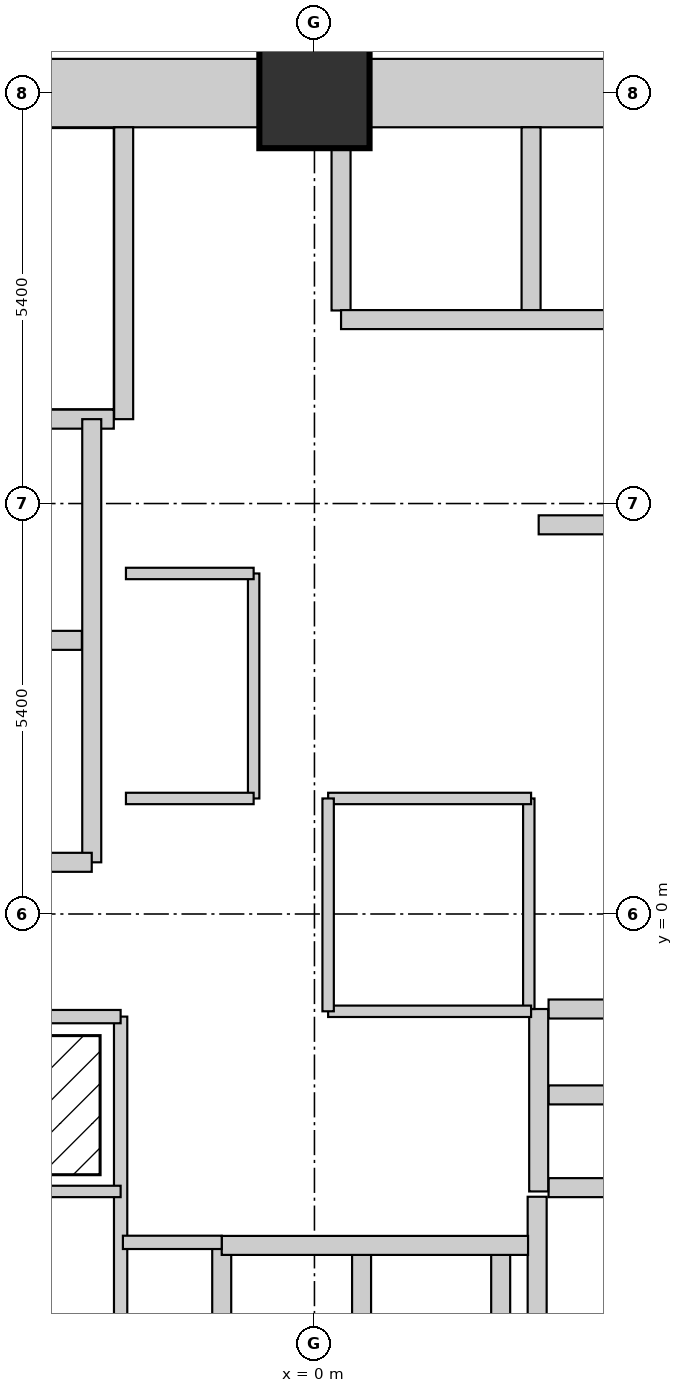
"""IFC4 building model, lengths in metres.
Left out: names, types, materials, properties, quantities, classifications, styles, units other than length and angle.
Written with IfcOpenShell. Run it as: python <this file> out.ifc"""

import sys

from ifc_helpers import new_model, si_unit, direction, frame, frame_2d, origin, origin_2d, place, context, subcontext, project, spatial, rectangle, extrude, element, fill, save


model = new_model("IFC4")
c1 = context("Model", 3, precision=1e-05, world=origin(), true_north=direction((0.0, 1.0)))
c2 = subcontext(c1, "Body", "Model", "MODEL_VIEW")
j1 = project(units=[si_unit("LENGTHUNIT", "METRE"), si_unit("PLANEANGLEUNIT", "RADIAN")], contexts=[c1])
p1 = place(None, origin())
s1 = spatial("IfcSite", under=j1, at=p1, CompositionType="ELEMENT")
p2 = place(p1, origin())
s2 = spatial("IfcBuilding", under=s1, at=p2, CompositionType="ELEMENT")
p3 = place(p2, frame((0.0, 0.0, 9.0)))
s3 = spatial("IfcBuildingStorey", under=s2, at=p3, CompositionType="ELEMENT", Elevation=9.0)
p4 = place(p3, frame((0.0, 10.8, 0.0), z_axis=(0.0, 0.0, 1.0), x_axis=(1.0, 0.0, 0.0)))
e1 = element("IfcColumn", 1, at=p4, inside=s3, PredefinedType="COLUMN", context=c2, shape_type="SweptSolid", body=[
    extrude(rectangle(XDim=1.45, YDim=1.45, at=origin_2d()), origin(), (0.0, 0.0, 1.0), 4.5),
])
p5 = place(p3, frame((-4.665, 10.8, 0.0), z_axis=(0.0, 0.0, 1.0), x_axis=(1.0, 0.0, 0.0)))
e2 = element("IfcWall", 2, at=p5, inside=s3, PredefinedType="SHEAR", context=c2, shape_type="SweptSolid", body=[
    extrude(rectangle(XDim=3.93, YDim=0.9, at=frame_2d((1.965, 0.0))), origin(), (0.0, 0.0, 1.0), 4.5),
])
p6 = place(p5, frame((2.58, 0.0, 0.0)))
e3 = element("IfcOpeningElement", 3, at=p6, cuts=e2, PredefinedType="OPENING", context=c2, shape_type="SweptSolid", body=[
    extrude(rectangle(XDim=1.1, YDim=2.1, at=frame_2d((0.55, 1.05))), frame((0.0, 0.46, 0.0), z_axis=(0.0, -1.0, 0.0), x_axis=(1.0, 0.0, 0.0)), (0.0, 0.0, 1.0), 0.92),
])
p7 = place(p3, frame((0.735, 10.8, 0.0), z_axis=(0.0, 0.0, 1.0), x_axis=(1.0, 0.0, 0.0)))
e4 = element("IfcWall", 4, at=p7, inside=s3, PredefinedType="SHEAR", context=c2, shape_type="SweptSolid", body=[
    extrude(rectangle(XDim=3.93, YDim=0.9, at=frame_2d((1.965, 0.0))), origin(), (0.0, 0.0, 1.0), 4.5),
])
p8 = place(p3, frame((2.93, -6.51, 0.0), z_axis=(0.0, 0.0, 1.0), x_axis=(0.0, 1.0, 0.0)))
e5 = element("IfcWall", 5, at=p8, inside=s3, PredefinedType="SHEAR", context=c2, shape_type="SweptSolid", body=[
    extrude(rectangle(XDim=2.79, YDim=0.25, at=frame_2d((1.395, 0.0))), origin(), (0.0, 0.0, 1.0), 4.5),
])
p9 = place(p3, frame((3.08, -3.6, 0.0), z_axis=(0.0, 0.0, 1.0), x_axis=(1.0, 0.0, 0.0)))
e6 = element("IfcWall", 6, at=p9, inside=s3, PredefinedType="SHEAR", context=c2, shape_type="SweptSolid", body=[
    extrude(rectangle(XDim=2.37, YDim=0.25, at=frame_2d((1.185, 0.0))), origin(), (0.0, 0.0, 1.0), 4.5),
])
for number, where, z_axis, x_axis in (
    (7, (0.62, -6.34, 0.0), (0.0, 0.0, 1.0), (0.0, 1.0, 0.0)),
    (8, (2.45, -6.34, 0.0), (0.0, 0.0, 1.0), (0.0, 1.0, 0.0)),
):
    element("IfcWall", number, at=place(p3, frame(where, z_axis=z_axis, x_axis=x_axis)), inside=s3, PredefinedType="SHEAR", context=c2, shape_type="SweptSolid", body=[
        extrude(rectangle(XDim=1.88, YDim=0.25, at=frame_2d((0.94, 0.0))), origin(), (0.0, 0.0, 1.0), 4.5),
    ])
p10 = place(p3, frame((-1.22, -6.44, 0.0), z_axis=(0.0, 0.0, 1.0), x_axis=(0.0, 1.0, 0.0)))
e9 = element("IfcWall", 9, at=p10, inside=s3, PredefinedType="SHEAR", context=c2, shape_type="SweptSolid", body=[
    extrude(rectangle(XDim=2.08, YDim=0.25, at=frame_2d((1.04, 0.0))), origin(), (0.0, 0.0, 1.0), 4.5),
])
p11 = place(p3, frame((-1.22, -4.36, 0.0), z_axis=(0.0, 0.0, 1.0), x_axis=(1.0, 0.0, 0.0)))
e10 = element("IfcWall", 10, at=p11, inside=s3, PredefinedType="SHEAR", context=c2, shape_type="SweptSolid", body=[
    extrude(rectangle(XDim=4.03, YDim=0.25, at=frame_2d((2.015, 0.0))), origin(), (0.0, 0.0, 1.0), 4.5),
])
p12 = place(p3, frame((2.85, 7.94, 0.0), z_axis=(0.0, 0.0, 1.0), x_axis=(0.0, 1.0, 0.0)))
e11 = element("IfcWall", 11, at=p12, inside=s3, PredefinedType="SHEAR", context=c2, shape_type="SweptSolid", body=[
    extrude(rectangle(XDim=2.41, YDim=0.25, at=frame_2d((1.205, 0.0))), origin(), (0.0, 0.0, 1.0), 4.5),
])
p13 = place(p3, frame((0.35, 7.94, 0.0), z_axis=(0.0, 0.0, 1.0), x_axis=(0.0, 1.0, 0.0)))
e12 = element("IfcWall", 12, at=p13, inside=s3, PredefinedType="SHEAR", context=c2, shape_type="SweptSolid", body=[
    extrude(rectangle(XDim=2.135, YDim=0.25, at=frame_2d((1.067, 0.0))), origin(), (0.0, 0.0, 1.0), 4.5),
])
p14 = place(p3, frame((0.35, 7.82, 0.0), z_axis=(0.0, 0.0, 1.0), x_axis=(1.0, 0.0, 0.0)))
e13 = element("IfcWall", 13, at=p14, inside=s3, PredefinedType="SHEAR", context=c2, shape_type="SweptSolid", body=[
    extrude(rectangle(XDim=10.0, YDim=0.25, at=frame_2d((5.0, 0.0))), origin(), (0.0, 0.0, 1.0), 4.5),
])
p15 = place(p14, frame((0.7, 0.0, 0.0)))
e14 = element("IfcOpeningElement", 14, at=p15, cuts=e13, PredefinedType="OPENING", context=c2, shape_type="SweptSolid", body=[
    extrude(rectangle(XDim=1.1, YDim=2.1, at=frame_2d((0.55, 1.05))), frame((0.0, 0.135, 0.0), z_axis=(0.0, -1.0, 0.0), x_axis=(1.0, 0.0, 0.0)), (0.0, 0.0, 1.0), 0.27),
])
p16 = place(p14, frame((3.2, 0.0, 0.0)))
e15 = element("IfcOpeningElement", 15, at=p16, cuts=e13, PredefinedType="OPENING", context=c2, shape_type="SweptSolid", body=[
    extrude(rectangle(XDim=1.1, YDim=2.1, at=frame_2d((0.55, 1.05))), frame((0.0, 0.135, 0.0), z_axis=(0.0, -1.0, 0.0), x_axis=(1.0, 0.0, 0.0)), (0.0, 0.0, 1.0), 0.27),
])
p17 = place(p14, frame((5.7, 0.0, 0.0)))
e16 = element("IfcOpeningElement", 16, at=p17, cuts=e13, PredefinedType="OPENING", context=c2, shape_type="SweptSolid", body=[
    extrude(rectangle(XDim=1.1, YDim=2.1, at=frame_2d((0.55, 1.05))), frame((0.0, 0.135, 0.0), z_axis=(0.0, -1.0, 0.0), x_axis=(1.0, 0.0, 0.0)), (0.0, 0.0, 1.0), 0.27),
])
p18 = place(p14, frame((8.2, 0.0, 0.0)))
e17 = element("IfcOpeningElement", 17, at=p18, cuts=e13, PredefinedType="OPENING", context=c2, shape_type="SweptSolid", body=[
    extrude(rectangle(XDim=1.1, YDim=2.1, at=frame_2d((0.55, 1.05))), frame((0.0, 0.135, 0.0), z_axis=(0.0, -1.0, 0.0), x_axis=(1.0, 0.0, 0.0)), (0.0, 0.0, 1.0), 0.27),
])
p19 = place(p3, frame((2.95, 5.12, 0.0), z_axis=(0.0, 0.0, 1.0), x_axis=(1.0, 0.0, 0.0)))
e18 = element("IfcWall", 18, at=p19, inside=s3, PredefinedType="SHEAR", context=c2, shape_type="SweptSolid", body=[
    extrude(rectangle(XDim=7.125, YDim=0.25, at=frame_2d((3.562, 0.0))), origin(), (0.0, 0.0, 1.0), 4.5),
])
for number, where, z_axis, x_axis in (
    (19, (3.08, -2.38, 0.0), (0.0, 0.0, 1.0), (1.0, 0.0, 0.0)),
    (20, (3.08, -1.25, 0.0), (0.0, 0.0, 1.0), (1.0, 0.0, 0.0)),
):
    element("IfcWall", number, at=place(p3, frame(where, z_axis=z_axis, x_axis=x_axis)), inside=s3, PredefinedType="SHEAR", context=c2, shape_type="SweptSolid", body=[
        extrude(rectangle(XDim=2.37, YDim=0.25, at=frame_2d((1.185, 0.0))), origin(), (0.0, 0.0, 1.0), 4.5),
    ])
p20 = place(p3, frame((2.95, -3.65, 0.0), z_axis=(0.0, 0.0, 1.0), x_axis=(0.0, 1.0, 0.0)))
e21 = element("IfcWall", 21, at=p20, inside=s3, PredefinedType="SHEAR", context=c2, shape_type="SweptSolid", body=[
    extrude(rectangle(XDim=2.4, YDim=0.25, at=frame_2d((1.2, 0.0))), origin(), (0.0, 0.0, 1.0), 4.5),
])
p21 = place(p20, frame((0.775, 0.0, 0.0)))
e22 = element("IfcOpeningElement", 22, at=p21, cuts=e21, PredefinedType="OPENING", context=c2, shape_type="SweptSolid", body=[
    extrude(rectangle(XDim=0.85, YDim=2.1, at=frame_2d((0.425, 1.05))), frame((0.0, 0.135, 0.0), z_axis=(0.0, -1.0, 0.0), x_axis=(1.0, 0.0, 0.0)), (0.0, 0.0, 1.0), 0.27),
])
p22 = place(p3, frame((-2.51, 6.51, 0.0), z_axis=(0.0, 0.0, 1.0), x_axis=(0.0, 1.0, 0.0)))
e23 = element("IfcWall", 23, at=p22, inside=s3, PredefinedType="SHEAR", context=c2, shape_type="SweptSolid", body=[
    extrude(rectangle(XDim=3.84, YDim=0.25, at=frame_2d((1.92, 0.0))), origin(), (0.0, 0.0, 1.0), 4.5),
])
p23 = place(p3, frame((-10.34, 6.51, 0.0), z_axis=(0.0, 0.0, 1.0), x_axis=(1.0, 0.0, 0.0)))
e24 = element("IfcWall", 24, at=p23, inside=s3, PredefinedType="SHEAR", context=c2, shape_type="SweptSolid", body=[
    extrude(rectangle(XDim=7.7, YDim=0.25, at=frame_2d((3.85, 0.0))), origin(), (0.0, 0.0, 1.0), 4.5),
])
p24 = place(p23, frame((0.35, 0.0, 0.0)))
e25 = element("IfcOpeningElement", 25, at=p24, cuts=e24, PredefinedType="OPENING", context=c2, shape_type="SweptSolid", body=[
    extrude(rectangle(XDim=1.1, YDim=2.1, at=frame_2d((0.55, 1.05))), frame((0.0, 0.135, 0.0), z_axis=(0.0, -1.0, 0.0), x_axis=(1.0, 0.0, 0.0)), (0.0, 0.0, 1.0), 0.27),
])
p25 = place(p3, frame((-2.93, 0.68, 0.0), z_axis=(0.0, 0.0, 1.0), x_axis=(0.0, 1.0, 0.0)))
e26 = element("IfcWall", 26, at=p25, inside=s3, PredefinedType="SHEAR", context=c2, shape_type="SweptSolid", body=[
    extrude(rectangle(XDim=5.83, YDim=0.25, at=frame_2d((2.915, 0.0))), origin(), (0.0, 0.0, 1.0), 4.5),
])
p26 = place(p25, frame((0.75, 0.0, 0.0)))
e27 = element("IfcOpeningElement", 27, at=p26, cuts=e26, PredefinedType="OPENING", context=c2, shape_type="SweptSolid", body=[
    extrude(rectangle(XDim=1.2, YDim=2.1, at=frame_2d((0.6, 1.05))), frame((0.0, 0.135, 0.0), z_axis=(0.0, -1.0, 0.0), x_axis=(1.0, 0.0, 0.0)), (0.0, 0.0, 1.0), 0.27),
])
p27 = place(p3, frame((-5.45, 3.6, 0.0), z_axis=(0.0, 0.0, 1.0), x_axis=(1.0, 0.0, 0.0)))
e28 = element("IfcWall", 28, at=p27, inside=s3, PredefinedType="SHEAR", context=c2, shape_type="SweptSolid", body=[
    extrude(rectangle(XDim=2.39, YDim=0.25, at=frame_2d((1.195, 0.0))), origin(), (0.0, 0.0, 1.0), 4.5),
])
p28 = place(p3, frame((-5.58, 0.68, 0.0), z_axis=(0.0, 0.0, 1.0), x_axis=(1.0, 0.0, 0.0)))
e29 = element("IfcWall", 29, at=p28, inside=s3, PredefinedType="SHEAR", context=c2, shape_type="SweptSolid", body=[
    extrude(rectangle(XDim=2.65, YDim=0.25, at=frame_2d((1.325, 0.0))), origin(), (0.0, 0.0, 1.0), 4.5),
])
p29 = place(p3, frame((2.82, -1.25, 0.0), z_axis=(0.0, 0.0, 1.0), x_axis=(0.0, 1.0, 0.0)))
e30 = element("IfcWall", 30, at=p29, inside=s3, PredefinedType="PARTITIONING", context=c2, shape_type="SweptSolid", body=[
    extrude(rectangle(XDim=2.77, YDim=0.15, at=frame_2d((1.385, 0.0))), origin(), (0.0, 0.0, 1.0), 4.25),
])
for number, where, z_axis, x_axis in (
    (31, (0.18, 1.52, 0.0), (0.0, 0.0, 1.0), (1.0, 0.0, 0.0)),
    (32, (0.18, -1.28, 0.0), (0.0, 0.0, 1.0), (1.0, 0.0, 0.0)),
):
    element("IfcWall", number, at=place(p3, frame(where, z_axis=z_axis, x_axis=x_axis)), inside=s3, PredefinedType="PARTITIONING", context=c2, shape_type="SweptSolid", body=[
        extrude(rectangle(XDim=2.67, YDim=0.15, at=frame_2d((1.335, 0.0))), origin(), (0.0, 0.0, 1.0), 4.25),
    ])
p30 = place(p3, frame((0.18, -1.28, 0.0), z_axis=(0.0, 0.0, 1.0), x_axis=(0.0, 1.0, 0.0)))
e33 = element("IfcWall", 33, at=p30, inside=s3, PredefinedType="PARTITIONING", context=c2, shape_type="SweptSolid", body=[
    extrude(rectangle(XDim=2.8, YDim=0.15, at=frame_2d((1.4, 0.0))), origin(), (0.0, 0.0, 1.0), 4.25),
])
p31 = place(p30, frame((0.85, 0.0, 0.0)))
e34 = element("IfcOpeningElement", 34, at=p31, cuts=e33, PredefinedType="OPENING", context=c2, shape_type="SweptSolid", body=[
    extrude(rectangle(XDim=0.85, YDim=2.1, at=frame_2d((0.425, 1.05))), frame((0.0, 0.085, 0.0), z_axis=(0.0, -1.0, 0.0), x_axis=(1.0, 0.0, 0.0)), (0.0, 0.0, 1.0), 0.17),
])
p32 = place(p3, frame((-2.55, -6.51, 0.0), z_axis=(0.0, 0.0, 1.0), x_axis=(0.0, 1.0, 0.0)))
e35 = element("IfcWall", 35, at=p32, inside=s3, PredefinedType="PARTITIONING", context=c2, shape_type="SweptSolid", body=[
    extrude(rectangle(XDim=5.16, YDim=0.175, at=frame_2d((2.58, 0.0))), origin(), (0.0, 0.0, 1.0), 4.25),
])
p33 = place(p32, frame((3.45, 0.0, 0.0)))
e36 = element("IfcOpeningElement", 36, at=p33, cuts=e35, PredefinedType="OPENING", context=c2, shape_type="SweptSolid", body=[
    extrude(rectangle(XDim=0.85, YDim=2.1, at=frame_2d((0.425, 1.05))), frame((0.0, 0.097, 0.0), z_axis=(0.0, -1.0, 0.0), x_axis=(1.0, 0.0, 0.0)), (0.0, 0.0, 1.0), 0.195),
])
p34 = place(p3, frame((-7.18, -3.65, 0.0), z_axis=(0.0, 0.0, 1.0), x_axis=(1.0, 0.0, 0.0)))
e37 = element("IfcWall", 37, at=p34, inside=s3, PredefinedType="PARTITIONING", context=c2, shape_type="SweptSolid", body=[
    extrude(rectangle(XDim=4.63, YDim=0.15, at=frame_2d((2.315, 0.0))), origin(), (0.0, 0.0, 1.0), 4.25),
])
p35 = place(p34, frame((1.0, 0.0, 0.0)))
e38 = element("IfcOpeningElement", 38, at=p35, cuts=e37, PredefinedType="OPENING", context=c2, shape_type="SweptSolid", body=[
    extrude(rectangle(XDim=0.85, YDim=2.1, at=frame_2d((0.425, 1.05))), frame((0.0, 0.085, 0.0), z_axis=(0.0, -1.0, 0.0), x_axis=(1.0, 0.0, 0.0)), (0.0, 0.0, 1.0), 0.17),
])
p36 = place(p3, frame((-7.18, -1.35, 0.0), z_axis=(0.0, 0.0, 1.0), x_axis=(1.0, 0.0, 0.0)))
e39 = element("IfcWall", 39, at=p36, inside=s3, PredefinedType="PARTITIONING", context=c2, shape_type="SweptSolid", body=[
    extrude(rectangle(XDim=4.63, YDim=0.175, at=frame_2d((2.315, 0.0))), origin(), (0.0, 0.0, 1.0), 4.25),
])
p37 = place(p3, frame((-2.52, -4.32, 0.0), z_axis=(0.0, 0.0, 1.0), x_axis=(1.0, 0.0, 0.0)))
e40 = element("IfcWall", 40, at=p37, inside=s3, PredefinedType="PARTITIONING", context=c2, shape_type="SweptSolid", body=[
    extrude(rectangle(XDim=1.3, YDim=0.175, at=frame_2d((0.65, 0.0))), origin(), (0.0, 0.0, 1.0), 4.25),
])
p38 = place(p37, frame((0.22, 0.0, 0.0)))
e41 = element("IfcOpeningElement", 41, at=p38, cuts=e40, PredefinedType="OPENING", context=c2, shape_type="SweptSolid", body=[
    extrude(rectangle(XDim=0.85, YDim=2.1, at=frame_2d((0.425, 1.05))), frame((0.0, 0.097, 0.0), z_axis=(0.0, -1.0, 0.0), x_axis=(1.0, 0.0, 0.0)), (0.0, 0.0, 1.0), 0.195),
])
p39 = place(p3, frame((-0.8, 1.52, 0.0), z_axis=(0.0, 0.0, 1.0), x_axis=(0.0, 1.0, 0.0)))
e42 = element("IfcWall", 42, at=p39, inside=s3, PredefinedType="PARTITIONING", context=c2, shape_type="SweptSolid", body=[
    extrude(rectangle(XDim=2.96, YDim=0.15, at=frame_2d((1.48, 0.0))), origin(), (0.0, 0.0, 1.0), 4.25),
])
p40 = place(p39, frame((0.95, 0.0, 0.0)))
e43 = element("IfcOpeningElement", 43, at=p40, cuts=e42, PredefinedType="OPENING", context=c2, shape_type="SweptSolid", body=[
    extrude(rectangle(XDim=0.85, YDim=2.1, at=frame_2d((0.425, 1.05))), frame((0.0, 0.085, 0.0), z_axis=(0.0, -1.0, 0.0), x_axis=(1.0, 0.0, 0.0)), (0.0, 0.0, 1.0), 0.17),
])
for number, where, z_axis, x_axis in (
    (44, (-2.48, 4.48, 0.0), (0.0, 0.0, 1.0), (1.0, 0.0, 0.0)),
    (45, (-2.48, 1.52, 0.0), (0.0, 0.0, 1.0), (1.0, 0.0, 0.0)),
):
    element("IfcWall", number, at=place(p3, frame(where, z_axis=z_axis, x_axis=x_axis)), inside=s3, PredefinedType="PARTITIONING", context=c2, shape_type="SweptSolid", body=[
        extrude(rectangle(XDim=1.68, YDim=0.15, at=frame_2d((0.84, 0.0))), origin(), (0.0, 0.0, 1.0), 4.25),
    ])
p41 = place(p31, origin())
e46 = element("IfcDoor", 46, at=p41, inside=s3, OperationType="SINGLE_SWING_RIGHT", PredefinedType="DOOR", context=c2, shape_type="SweptSolid", body=[
    extrude(rectangle(XDim=0.85, YDim=2.1, at=frame_2d((0.425, 1.05))), frame((0.0, 0.025, 0.0), z_axis=(0.0, -1.0, 0.0), x_axis=(1.0, 0.0, 0.0)), (0.0, 0.0, 1.0), 0.05),
])
fill(e34, e46)
p42 = place(p40, origin())
e47 = element("IfcDoor", 47, at=p42, inside=s3, OperationType="SINGLE_SWING_LEFT", PredefinedType="DOOR", context=c2, shape_type="SweptSolid", body=[
    extrude(rectangle(XDim=0.85, YDim=2.1, at=frame_2d((0.425, 1.05))), frame((0.0, 0.025, 0.0), z_axis=(0.0, -1.0, 0.0), x_axis=(1.0, 0.0, 0.0)), (0.0, 0.0, 1.0), 0.05),
])
fill(e43, e47)
p43 = place(p21, origin())
e48 = element("IfcDoor", 48, at=p43, inside=s3, OperationType="SINGLE_SWING_LEFT", PredefinedType="DOOR", context=c2, shape_type="SweptSolid", body=[
    extrude(rectangle(XDim=0.85, YDim=2.1, at=frame_2d((0.425, 1.05))), frame((0.0, 0.025, 0.0), z_axis=(0.0, -1.0, 0.0), x_axis=(1.0, 0.0, 0.0)), (0.0, 0.0, 1.0), 0.05),
])
fill(e22, e48)
p44 = place(p6, origin())
e49 = element("IfcDoor", 49, at=p44, inside=s3, OperationType="SINGLE_SWING_LEFT", PredefinedType="DOOR", context=c2, shape_type="SweptSolid", body=[
    extrude(rectangle(XDim=1.1, YDim=2.1, at=frame_2d((0.55, 1.05))), frame((0.0, 0.025, 0.0), z_axis=(0.0, -1.0, 0.0), x_axis=(1.0, 0.0, 0.0)), (0.0, 0.0, 1.0), 0.05),
])
fill(e3, e49)
p45 = place(p26, origin())
e50 = element("IfcDoor", 50, at=p45, inside=s3, OperationType="SLIDING_TO_LEFT", PredefinedType="DOOR", context=c2, shape_type="SweptSolid", body=[
    extrude(rectangle(XDim=1.2, YDim=2.1, at=frame_2d((0.6, 1.05))), frame((0.0, 0.025, 0.0), z_axis=(0.0, -1.0, 0.0), x_axis=(1.0, 0.0, 0.0)), (0.0, 0.0, 1.0), 0.05),
])
fill(e27, e50)
p46 = place(p15, origin())
e51 = element("IfcDoor", 51, at=p46, inside=s3, OperationType="SLIDING_TO_LEFT", PredefinedType="DOOR", context=c2, shape_type="SweptSolid", body=[
    extrude(rectangle(XDim=1.1, YDim=2.1, at=frame_2d((0.55, 1.05))), frame((0.0, 0.025, 0.0), z_axis=(0.0, -1.0, 0.0), x_axis=(1.0, 0.0, 0.0)), (0.0, 0.0, 1.0), 0.05),
])
fill(e14, e51)
p47 = place(p16, origin())
e52 = element("IfcDoor", 52, at=p47, inside=s3, OperationType="SLIDING_TO_LEFT", PredefinedType="DOOR", context=c2, shape_type="SweptSolid", body=[
    extrude(rectangle(XDim=1.1, YDim=2.1, at=frame_2d((0.55, 1.05))), frame((0.0, 0.025, 0.0), z_axis=(0.0, -1.0, 0.0), x_axis=(1.0, 0.0, 0.0)), (0.0, 0.0, 1.0), 0.05),
])
fill(e15, e52)
p48 = place(p38, origin())
e53 = element("IfcDoor", 53, at=p48, inside=s3, OperationType="SINGLE_SWING_LEFT", PredefinedType="DOOR", context=c2, shape_type="SweptSolid", body=[
    extrude(rectangle(XDim=0.85, YDim=2.1, at=frame_2d((0.425, 1.05))), frame((0.0, 0.025, 0.0), z_axis=(0.0, -1.0, 0.0), x_axis=(1.0, 0.0, 0.0)), (0.0, 0.0, 1.0), 0.05),
])
fill(e41, e53)
p49 = place(p33, origin())
e54 = element("IfcDoor", 54, at=p49, inside=s3, OperationType="SINGLE_SWING_LEFT", PredefinedType="DOOR", context=c2, shape_type="SweptSolid", body=[
    extrude(rectangle(XDim=0.85, YDim=2.1, at=frame_2d((0.425, 1.05))), frame((0.0, 0.025, 0.0), z_axis=(0.0, -1.0, 0.0), x_axis=(1.0, 0.0, 0.0)), (0.0, 0.0, 1.0), 0.05),
])
fill(e36, e54)
save(model, sys.argv[1])
